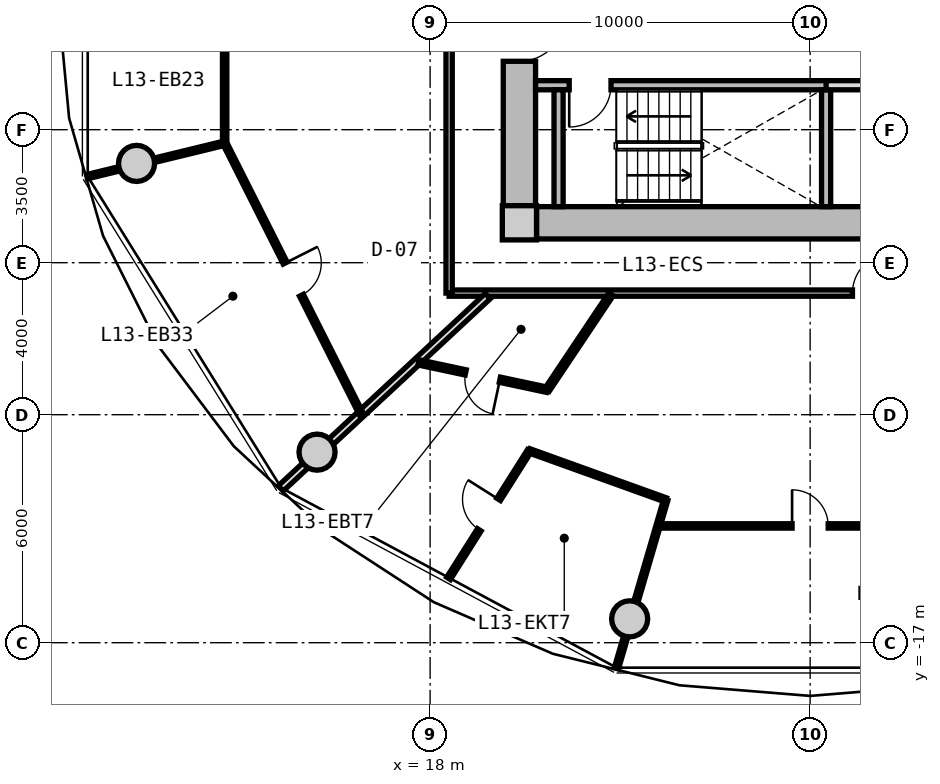
"""IFC4 building model, lengths in metres.
Left out: names, types, materials, properties, quantities, classifications, styles, units other than length and angle.
Written with IfcOpenShell. Run it as: python <this file> out.ifc"""

import sys

from ifc_helpers import new_model, si_unit, direction, frame, frame_2d, origin, origin_2d, place, context, subcontext, project, spatial, rectangle, circle, extrude, source, transform, mapped, element, fill, save


model = new_model("IFC4")
c1 = context("Model", 3, precision=1e-05, world=origin(), true_north=direction((0.0, 1.0)))
c2 = subcontext(c1, "Body", "Model", "MODEL_VIEW")
j1 = project(units=[si_unit("LENGTHUNIT", "METRE"), si_unit("PLANEANGLEUNIT", "RADIAN")], contexts=[c1])
p1 = place(None, origin())
s1 = spatial("IfcSite", under=j1, at=p1, CompositionType="ELEMENT")
p2 = place(p1, origin())
s2 = spatial("IfcBuilding", under=s1, at=p2, CompositionType="ELEMENT")
p3 = place(p2, frame((0.0, 0.0, 46.0)))
s3 = spatial("IfcBuildingStorey", under=s2, at=p3, CompositionType="ELEMENT", Elevation=46.0)
m1 = source(origin(), c2, "Body", "SweptSolid", [
    extrude(rectangle(XDim=0.9, YDim=0.9, at=origin_2d()), origin(), (0.0, 0.0, 1.0), 3.05),
])
p4 = place(p3, frame((20.35, -5.95, 0.0), z_axis=(0.0, 0.0, 1.0), x_axis=(1.0, 0.0, 0.0)))
e1 = element("IfcColumn", 1, at=p4, inside=s3, PredefinedType="COLUMN", context=c2, shape_type="MappedRepresentation", body=[
    mapped(m1, transform((0.0, 0.0, 0.0), x_axis=(1.0, 0.0, 0.0), y_axis=(0.0, 1.0, 0.0), z_axis=(0.0, 0.0, 1.0), scale=1.0)),
])
m2 = source(origin(), c2, "Body", "SweptSolid", [
    extrude(rectangle(XDim=14.4, YDim=0.85, at=frame_2d((7.2, 0.0))), origin(), (0.0, 0.0, 1.0), 2.79),
])
p5 = place(p3, frame((35.2, -5.95, 0.0), z_axis=(0.0, 0.0, 1.0), x_axis=(-1.0, 0.0, 0.0)))
e2 = element("IfcWall", 2, at=p5, inside=s3, PredefinedType="SHEAR", context=c2, shape_type="MappedRepresentation", body=[
    mapped(m2, transform((0.0, 0.0, 0.0), x_axis=(1.0, 0.0, 0.0), y_axis=(0.0, 1.0, 0.0), z_axis=(0.0, 0.0, 1.0), scale=1.0)),
])
m3 = source(origin(), c2, "Body", "SweptSolid", [
    extrude(rectangle(XDim=11.0, YDim=0.85, at=frame_2d((5.5, 0.0))), origin(), (0.0, 0.0, 1.0), 2.79),
])
p6 = place(p3, frame((20.35, -5.5, 0.0), z_axis=(0.0, 0.0, 1.0), x_axis=(0.0, 1.0, 0.0)))
e3 = element("IfcWall", 3, at=p6, inside=s3, PredefinedType="SHEAR", context=c2, shape_type="MappedRepresentation", body=[
    mapped(m3, transform((0.0, 0.0, 0.0), x_axis=(1.0, 0.0, 0.0), y_axis=(0.0, 1.0, 0.0), z_axis=(0.0, 0.0, 1.0), scale=1.0)),
])
p7 = place(p6, frame((3.8, 0.0, 0.0)))
e4 = element("IfcOpeningElement", 4, at=p7, cuts=e3, PredefinedType="OPENING", context=c2, shape_type="SweptSolid", body=[
    extrude(rectangle(XDim=1.2, YDim=2.15, at=frame_2d((0.6, 1.075))), frame((0.0, 0.435, 0.0), z_axis=(0.0, -1.0, 0.0), x_axis=(1.0, 0.0, 0.0)), (0.0, 0.0, 1.0), 0.87),
])
m4 = source(origin(), c2, "Body", "SweptSolid", [
    extrude(circle(Radius=0.475, at=origin_2d()), origin(), (0.0, 0.0, 1.0), 3.05),
])
for number, where, z_axis, x_axis in (
    (5, (10.275, -4.387, 0.0), (0.0, 0.0, 1.0), (1.0, 0.0, 0.0)),
    (6, (15.025, -11.985, 0.0), (0.0, 0.0, 1.0), (1.0, 0.0, 0.0)),
    (7, (23.251, -16.373, 0.0), (0.0, 0.0, 1.0), (1.0, 0.0, 0.0)),
):
    element("IfcColumn", number, at=place(p3, frame(where, z_axis=z_axis, x_axis=x_axis)), inside=s3, PredefinedType="COLUMN", context=c2, shape_type="MappedRepresentation", body=[
        mapped(m4, transform((0.0, 0.0, 0.0), x_axis=(1.0, 0.0, 0.0), y_axis=(0.0, 1.0, 0.0), z_axis=(0.0, 0.0, 1.0), scale=1.0)),
    ])
m5 = source(origin(), c2, "Body", "SweptSolid", [
    extrude(rectangle(XDim=7.765, YDim=0.24, at=frame_2d((3.883, 0.0))), origin(), (0.0, 0.0, 1.0), 2.79),
])
p8 = place(p3, frame((20.775, -2.33, 0.0), z_axis=(0.0, 0.0, 1.0), x_axis=(1.0, 0.0, 0.0)))
e8 = element("IfcWall", 8, at=p8, inside=s3, PredefinedType="PARTITIONING", context=c2, shape_type="MappedRepresentation", body=[
    mapped(m5, transform((0.0, 0.0, 0.0), x_axis=(1.0, 0.0, 0.0), y_axis=(0.0, 1.0, 0.0), z_axis=(0.0, 0.0, 1.0), scale=1.0)),
])
p9 = place(p8, frame((0.885, 0.0, 0.0)))
e9 = element("IfcOpeningElement", 9, at=p9, cuts=e8, PredefinedType="OPENING", context=c2, shape_type="SweptSolid", body=[
    extrude(rectangle(XDim=1.1, YDim=2.15, at=frame_2d((0.55, 1.075))), frame((0.0, 0.13, 0.0), z_axis=(0.0, -1.0, 0.0), x_axis=(1.0, 0.0, 0.0)), (0.0, 0.0, 1.0), 0.26),
])
m6 = source(origin(), c2, "Body", "SweptSolid", [
    extrude(rectangle(XDim=3.075, YDim=0.24, at=frame_2d((1.538, 0.0))), origin(), (0.0, 0.0, 1.0), 2.79),
])
for number, where, z_axis, x_axis in (
    (10, (21.38, -5.525, 0.0), (0.0, 0.0, 1.0), (0.0, 1.0, 0.0)),
    (11, (28.42, -5.525, 0.0), (0.0, 0.0, 1.0), (0.0, 1.0, 0.0)),
):
    element("IfcWall", number, at=place(p3, frame(where, z_axis=z_axis, x_axis=x_axis)), inside=s3, PredefinedType="PARTITIONING", context=c2, shape_type="MappedRepresentation", body=[
        mapped(m6, transform((0.0, 0.0, 0.0), x_axis=(1.0, 0.0, 0.0), y_axis=(0.0, 1.0, 0.0), z_axis=(0.0, 0.0, 1.0), scale=1.0)),
    ])
m7 = source(origin(), c2, "Body", "SweptSolid", [
    extrude(rectangle(XDim=4.13, YDim=0.24, at=frame_2d((2.065, 0.0))), origin(), (0.0, 0.0, 1.0), 2.775),
])
p10 = place(p3, frame((28.42, -2.33, 0.0), z_axis=(0.0, 0.0, 1.0), x_axis=(1.0, 0.0, 0.0)))
e12 = element("IfcWall", 12, at=p10, inside=s3, PredefinedType="PARTITIONING", context=c2, shape_type="MappedRepresentation", body=[
    mapped(m7, transform((0.0, 0.0, 0.0), x_axis=(1.0, 0.0, 0.0), y_axis=(0.0, 1.0, 0.0), z_axis=(0.0, 0.0, 1.0), scale=1.0)),
])
m8 = source(origin(), c2, "Body", "SweptSolid", [
    extrude(rectangle(XDim=19.0, YDim=0.165, at=frame_2d((9.5, 0.0))), origin(), (0.0, 0.0, 1.0), 2.775),
])
p11 = place(p3, frame((37.5, -7.8, 0.0), z_axis=(0.0, 0.0, 1.0), x_axis=(-1.0, 0.0, 0.0)))
e13 = element("IfcWall", 13, at=p11, inside=s3, PredefinedType="PARTITIONING", context=c2, shape_type="MappedRepresentation", body=[
    mapped(m8, transform((0.0, 0.0, 0.0), x_axis=(1.0, 0.0, 0.0), y_axis=(0.0, 1.0, 0.0), z_axis=(0.0, 0.0, 1.0), scale=1.0)),
])
p12 = place(p11, frame((7.336, 0.0, 0.0)))
e14 = element("IfcOpeningElement", 14, at=p12, cuts=e13, PredefinedType="OPENING", context=c2, shape_type="SweptSolid", body=[
    extrude(rectangle(XDim=1.05, YDim=2.15, at=frame_2d((0.525, 1.075))), frame((0.0, 0.093, 0.0), z_axis=(0.0, -1.0, 0.0), x_axis=(1.0, 0.0, 0.0)), (0.0, 0.0, 1.0), 0.185),
])
m9 = source(origin(), c2, "Body", "SweptSolid", [
    extrude(rectangle(XDim=15.6, YDim=0.165, at=frame_2d((7.8, 0.0))), origin(), (0.0, 0.0, 1.0), 2.775),
])
p13 = place(p3, frame((18.5, -7.8, 0.0), z_axis=(0.0, 0.0, 1.0), x_axis=(0.0, 1.0, 0.0)))
e15 = element("IfcWall", 15, at=p13, inside=s3, PredefinedType="PARTITIONING", context=c2, shape_type="MappedRepresentation", body=[
    mapped(m9, transform((0.0, 0.0, 0.0), x_axis=(1.0, 0.0, 0.0), y_axis=(0.0, 1.0, 0.0), z_axis=(0.0, 0.0, 1.0), scale=1.0)),
])
p14 = place(p13, frame((7.275, 0.0, 0.0)))
e16 = element("IfcOpeningElement", 16, at=p14, cuts=e15, PredefinedType="OPENING", context=c2, shape_type="SweptSolid", body=[
    extrude(rectangle(XDim=1.05, YDim=2.15, at=frame_2d((0.525, 1.075))), frame((0.0, 0.093, 0.0), z_axis=(0.0, -1.0, 0.0), x_axis=(1.0, 0.0, 0.0)), (0.0, 0.0, 1.0), 0.185),
])
m10 = source(origin(), c2, "Body", "SweptSolid", [
    extrude(rectangle(XDim=7.435, YDim=0.19, at=frame_2d((3.717, 0.0))), origin(), (0.0, 0.0, 1.0), 2.225),
])
p15 = place(p3, frame((19.517, -7.88, 0.0), z_axis=(0.0, 0.0, 1.0), x_axis=(-0.732651956848, -0.680603489652, 0.0)))
e17 = element("IfcWall", 17, at=p15, inside=s3, PredefinedType="PARTITIONING", context=c2, shape_type="MappedRepresentation", body=[
    mapped(m10, transform((0.0, 0.0, 0.0), x_axis=(1.0, 0.0, 0.0), y_axis=(0.0, 1.0, 0.0), z_axis=(0.0, 0.0, 1.0), scale=1.0)),
])
m11 = source(origin(), c2, "Body", "SweptSolid", [
    extrude(rectangle(XDim=7.709, YDim=0.115, at=frame_2d((3.855, 0.0))), origin(), (0.0, 0.0, 1.0), 2.775),
])
p16 = place(p3, frame((12.594, 3.855, 0.0), z_axis=(0.0, 0.0, 1.0), x_axis=(0.0, -1.0, 0.0)))
e18 = element("IfcWall", 18, at=p16, inside=s3, PredefinedType="PARTITIONING", context=c2, shape_type="MappedRepresentation", body=[
    mapped(m11, transform((0.0, 0.0, 0.0), x_axis=(1.0, 0.0, 0.0), y_axis=(0.0, 1.0, 0.0), z_axis=(0.0, 0.0, 1.0), scale=1.0)),
])
p17 = place(p16, frame((3.38, 0.0, 0.0)))
e19 = element("IfcOpeningElement", 19, at=p17, cuts=e18, PredefinedType="OPENING", context=c2, shape_type="SweptSolid", body=[
    extrude(rectangle(XDim=0.95, YDim=2.1, at=frame_2d((0.475, 1.05))), frame((0.0, 0.067, 0.0), z_axis=(0.0, -1.0, 0.0), x_axis=(1.0, 0.0, 0.0)), (0.0, 0.0, 1.0), 0.135),
])
m12 = source(origin(), c2, "Body", "SweptSolid", [
    extrude(rectangle(XDim=8.018, YDim=0.115, at=frame_2d((4.009, 0.0))), origin(), (0.0, 0.0, 1.0), 2.775),
])
p18 = place(p3, frame((12.596, -3.854, 0.0), z_axis=(0.0, 0.0, 1.0), x_axis=(0.450134355233, -0.89296084026, 0.0)))
e20 = element("IfcWall", 20, at=p18, inside=s3, PredefinedType="PARTITIONING", context=c2, shape_type="MappedRepresentation", body=[
    mapped(m12, transform((0.0, 0.0, 0.0), x_axis=(1.0, 0.0, 0.0), y_axis=(0.0, 1.0, 0.0), z_axis=(0.0, 0.0, 1.0), scale=1.0)),
])
p19 = place(p18, frame((3.534, 0.0, 0.0)))
e21 = element("IfcOpeningElement", 21, at=p19, cuts=e20, PredefinedType="OPENING", context=c2, shape_type="SweptSolid", body=[
    extrude(rectangle(XDim=0.95, YDim=2.1, at=frame_2d((0.475, 1.05))), frame((0.0, 0.067, 0.0), z_axis=(0.0, -1.0, 0.0), x_axis=(1.0, 0.0, 0.0)), (0.0, 0.0, 1.0), 0.135),
])
m13 = source(origin(), c2, "Body", "SweptSolid", [
    extrude(rectangle(XDim=3.73, YDim=0.115, at=frame_2d((1.865, 0.0))), origin(), (0.0, 0.0, 1.0), 2.225),
])
p20 = place(p3, frame((12.596, -3.854, 0.0), z_axis=(0.0, 0.0, 1.0), x_axis=(-0.971644038568, -0.236448434791, 0.0)))
e22 = element("IfcWall", 22, at=p20, inside=s3, PredefinedType="PARTITIONING", context=c2, shape_type="MappedRepresentation", body=[
    mapped(m13, transform((0.0, 0.0, 0.0), x_axis=(1.0, 0.0, 0.0), y_axis=(0.0, 1.0, 0.0), z_axis=(0.0, 0.0, 1.0), scale=1.0)),
])
m14 = source(origin(), c2, "Body", "SweptSolid", [
    extrude(rectangle(XDim=7.993, YDim=0.115, at=frame_2d((3.996, 0.0))), origin(), (0.0, 0.0, 1.0), 2.775),
])
p21 = place(p3, frame((24.004, -13.927, 0.0), z_axis=(0.0, 0.0, 1.0), x_axis=(1.0, 0.0, 0.0)))
e23 = element("IfcWall", 23, at=p21, inside=s3, PredefinedType="PARTITIONING", context=c2, shape_type="MappedRepresentation", body=[
    mapped(m14, transform((0.0, 0.0, 0.0), x_axis=(1.0, 0.0, 0.0), y_axis=(0.0, 1.0, 0.0), z_axis=(0.0, 0.0, 1.0), scale=1.0)),
])
p22 = place(p21, frame((3.521, 0.0, 0.0)))
e24 = element("IfcOpeningElement", 24, at=p22, cuts=e23, PredefinedType="OPENING", context=c2, shape_type="SweptSolid", body=[
    extrude(rectangle(XDim=0.95, YDim=2.1, at=frame_2d((0.475, 1.05))), frame((0.0, 0.067, 0.0), z_axis=(0.0, -1.0, 0.0), x_axis=(1.0, 0.0, 0.0)), (0.0, 0.0, 1.0), 0.135),
])
m15 = source(origin(), c2, "Body", "SweptSolid", [
    extrude(rectangle(XDim=4.625, YDim=0.115, at=frame_2d((2.312, 0.0))), origin(), (0.0, 0.0, 1.0), 2.225),
])
p23 = place(p3, frame((24.201, -13.239, 0.0), z_axis=(0.0, 0.0, 1.0), x_axis=(-0.2810742844, -0.959686014616, 0.0)))
e25 = element("IfcWall", 25, at=p23, inside=s3, PredefinedType="PARTITIONING", context=c2, shape_type="MappedRepresentation", body=[
    mapped(m15, transform((0.0, 0.0, 0.0), x_axis=(1.0, 0.0, 0.0), y_axis=(0.0, 1.0, 0.0), z_axis=(0.0, 0.0, 1.0), scale=1.0)),
])
m16 = source(origin(), c2, "Body", "SweptSolid", [
    extrude(rectangle(XDim=3.025, YDim=0.14, at=frame_2d((1.513, 0.0))), origin(), (0.0, 0.0, 1.0), 2.775),
])
p24 = place(p3, frame((22.76, -7.83, 0.0), z_axis=(0.0, 0.0, 1.0), x_axis=(-0.556189165904, -0.831055721195, 0.0)))
e26 = element("IfcWall", 26, at=p24, inside=s3, PredefinedType="PARTITIONING", context=c2, shape_type="MappedRepresentation", body=[
    mapped(m16, transform((0.0, 0.0, 0.0), x_axis=(1.0, 0.0, 0.0), y_axis=(0.0, 1.0, 0.0), z_axis=(0.0, 0.0, 1.0), scale=1.0)),
])
m17 = source(origin(), c2, "Body", "SweptSolid", [
    extrude(rectangle(XDim=3.459, YDim=0.14, at=frame_2d((1.729, 0.0))), origin(), (0.0, 0.0, 1.0), 2.775),
])
p25 = place(p3, frame((21.078, -10.344, 0.0), z_axis=(0.0, 0.0, 1.0), x_axis=(-0.978006468578, 0.208574560815, 0.0)))
e27 = element("IfcWall", 27, at=p25, inside=s3, PredefinedType="PARTITIONING", context=c2, shape_type="MappedRepresentation", body=[
    mapped(m17, transform((0.0, 0.0, 0.0), x_axis=(1.0, 0.0, 0.0), y_axis=(0.0, 1.0, 0.0), z_axis=(0.0, 0.0, 1.0), scale=1.0)),
])
p26 = place(p25, frame((1.27, 0.0, 0.0)))
e28 = element("IfcOpeningElement", 28, at=p26, cuts=e27, PredefinedType="OPENING", context=c2, shape_type="SweptSolid", body=[
    extrude(rectangle(XDim=0.92, YDim=2.1, at=frame_2d((0.46, 1.05))), frame((0.0, 0.08, 0.0), z_axis=(0.0, -1.0, 0.0), x_axis=(1.0, 0.0, 0.0)), (0.0, 0.0, 1.0), 0.16),
])
m18 = source(origin(), c2, "Body", "SweptSolid", [
    extrude(rectangle(XDim=3.974, YDim=0.115, at=frame_2d((1.987, 0.0))), origin(), (0.0, 0.0, 1.0), 2.775),
])
p27 = place(p3, frame((20.611, -11.95, 0.0), z_axis=(0.0, 0.0, 1.0), x_axis=(-0.534810918023, -0.844971764003, 0.0)))
e29 = element("IfcWall", 29, at=p27, inside=s3, PredefinedType="PARTITIONING", context=c2, shape_type="MappedRepresentation", body=[
    mapped(m18, transform((0.0, 0.0, 0.0), x_axis=(1.0, 0.0, 0.0), y_axis=(0.0, 1.0, 0.0), z_axis=(0.0, 0.0, 1.0), scale=1.0)),
])
p28 = place(p27, frame((1.512, 0.0, 0.0)))
e30 = element("IfcOpeningElement", 30, at=p28, cuts=e29, PredefinedType="OPENING", context=c2, shape_type="SweptSolid", body=[
    extrude(rectangle(XDim=0.95, YDim=2.1, at=frame_2d((0.475, 1.05))), frame((0.0, 0.067, 0.0), z_axis=(0.0, -1.0, 0.0), x_axis=(1.0, 0.0, 0.0)), (0.0, 0.0, 1.0), 0.135),
])
m19 = source(origin(), c2, "Body", "SweptSolid", [
    extrude(rectangle(XDim=3.814, YDim=0.115, at=frame_2d((1.907, 0.0))), origin(), (0.0, 0.0, 1.0), 2.775),
])
p29 = place(p3, frame((20.611, -11.95, 0.0), z_axis=(0.0, 0.0, 1.0), x_axis=(0.940935542004, -0.338585743637, 0.0)))
e31 = element("IfcWall", 31, at=p29, inside=s3, PredefinedType="PARTITIONING", context=c2, shape_type="MappedRepresentation", body=[
    mapped(m19, transform((0.0, 0.0, 0.0), x_axis=(1.0, 0.0, 0.0), y_axis=(0.0, 1.0, 0.0), z_axis=(0.0, 0.0, 1.0), scale=1.0)),
])
m20 = source(origin(), c2, "Body", "SweptSolid", [
    extrude(rectangle(XDim=1.1, YDim=2.15, at=frame_2d((0.55, 1.075))), frame((0.0, 0.025, 0.0), z_axis=(0.0, -1.0, 0.0), x_axis=(1.0, 0.0, 0.0)), (0.0, 0.0, 1.0), 0.05),
])
p30 = place(p9, frame((1.1, 0.0, 0.0), z_axis=(0.0, 0.0, 1.0), x_axis=(-1.0, 0.0, 0.0)))
e32 = element("IfcDoor", 32, at=p30, inside=s3, OperationType="SINGLE_SWING_RIGHT", PredefinedType="DOOR", context=c2, shape_type="MappedRepresentation", body=[
    mapped(m20, transform((0.0, 0.0, 0.0), x_axis=(1.0, 0.0, 0.0), y_axis=(0.0, 1.0, 0.0), z_axis=(0.0, 0.0, 1.0), scale=1.0)),
])
fill(e9, e32)
m21 = source(origin(), c2, "Body", "SweptSolid", [
    extrude(rectangle(XDim=1.2, YDim=2.15, at=frame_2d((0.6, 1.075))), frame((0.0, 0.025, 0.0), z_axis=(0.0, -1.0, 0.0), x_axis=(1.0, 0.0, 0.0)), (0.0, 0.0, 1.0), 0.05),
])
p31 = place(p7, frame((1.2, 0.0, 0.0), z_axis=(0.0, 0.0, 1.0), x_axis=(-1.0, 0.0, 0.0)))
e33 = element("IfcDoor", 33, at=p31, inside=s3, OperationType="SINGLE_SWING_LEFT", PredefinedType="DOOR", context=c2, shape_type="MappedRepresentation", body=[
    mapped(m21, transform((0.0, 0.0, 0.0), x_axis=(1.0, 0.0, 0.0), y_axis=(0.0, 1.0, 0.0), z_axis=(0.0, 0.0, 1.0), scale=1.0)),
])
fill(e4, e33)
m22 = source(origin(), c2, "Body", "SweptSolid", [
    extrude(rectangle(XDim=0.95, YDim=2.1, at=frame_2d((0.475, 1.05))), frame((0.0, 0.025, 0.0), z_axis=(0.0, -1.0, 0.0), x_axis=(1.0, 0.0, 0.0)), (0.0, 0.0, 1.0), 0.05),
])
p32 = place(p19, origin())
e34 = element("IfcDoor", 34, at=p32, inside=s3, OperationType="SINGLE_SWING_LEFT", PredefinedType="DOOR", context=c2, shape_type="MappedRepresentation", body=[
    mapped(m22, transform((0.0, 0.0, 0.0), x_axis=(1.0, 0.0, 0.0), y_axis=(0.0, 1.0, 0.0), z_axis=(0.0, 0.0, 1.0), scale=1.0)),
])
fill(e21, e34)
m23 = source(origin(), c2, "Body", "SweptSolid", [
    extrude(rectangle(XDim=1.05, YDim=2.15, at=frame_2d((0.525, 1.075))), frame((0.0, 0.025, 0.0), z_axis=(0.0, -1.0, 0.0), x_axis=(1.0, 0.0, 0.0)), (0.0, 0.0, 1.0), 0.05),
])
p33 = place(p12, frame((1.05, 0.0, 0.0), z_axis=(0.0, 0.0, 1.0), x_axis=(-1.0, 0.0, 0.0)))
e35 = element("IfcDoor", 35, at=p33, inside=s3, OperationType="SINGLE_SWING_RIGHT", PredefinedType="DOOR", context=c2, shape_type="MappedRepresentation", body=[
    mapped(m23, transform((0.0, 0.0, 0.0), x_axis=(1.0, 0.0, 0.0), y_axis=(0.0, 1.0, 0.0), z_axis=(0.0, 0.0, 1.0), scale=1.0)),
])
fill(e14, e35)
m24 = source(origin(), c2, "Body", "SweptSolid", [
    extrude(rectangle(XDim=0.92, YDim=2.1, at=frame_2d((0.46, 1.05))), frame((0.0, 0.025, 0.0), z_axis=(0.0, -1.0, 0.0), x_axis=(1.0, 0.0, 0.0)), (0.0, 0.0, 1.0), 0.05),
])
p34 = place(p26, origin())
e36 = element("IfcDoor", 36, at=p34, inside=s3, OperationType="SINGLE_SWING_LEFT", PredefinedType="DOOR", context=c2, shape_type="MappedRepresentation", body=[
    mapped(m24, transform((0.0, 0.0, 0.0), x_axis=(1.0, 0.0, 0.0), y_axis=(0.0, 1.0, 0.0), z_axis=(0.0, 0.0, 1.0), scale=1.0)),
])
fill(e28, e36)
p35 = place(p28, frame((0.95, 0.0, 0.0), z_axis=(0.0, 0.0, 1.0), x_axis=(-1.0, 0.0, 0.0)))
e37 = element("IfcDoor", 37, at=p35, inside=s3, OperationType="SINGLE_SWING_RIGHT", PredefinedType="DOOR", context=c2, shape_type="MappedRepresentation", body=[
    mapped(m22, transform((0.0, 0.0, 0.0), x_axis=(1.0, 0.0, 0.0), y_axis=(0.0, 1.0, 0.0), z_axis=(0.0, 0.0, 1.0), scale=1.0)),
])
fill(e30, e37)
p36 = place(p22, origin())
e38 = element("IfcDoor", 38, at=p36, inside=s3, OperationType="SINGLE_SWING_LEFT", PredefinedType="DOOR", context=c2, shape_type="MappedRepresentation", body=[
    mapped(m22, transform((0.0, 0.0, 0.0), x_axis=(1.0, 0.0, 0.0), y_axis=(0.0, 1.0, 0.0), z_axis=(0.0, 0.0, 1.0), scale=1.0)),
])
fill(e24, e38)
save(model, sys.argv[1])
